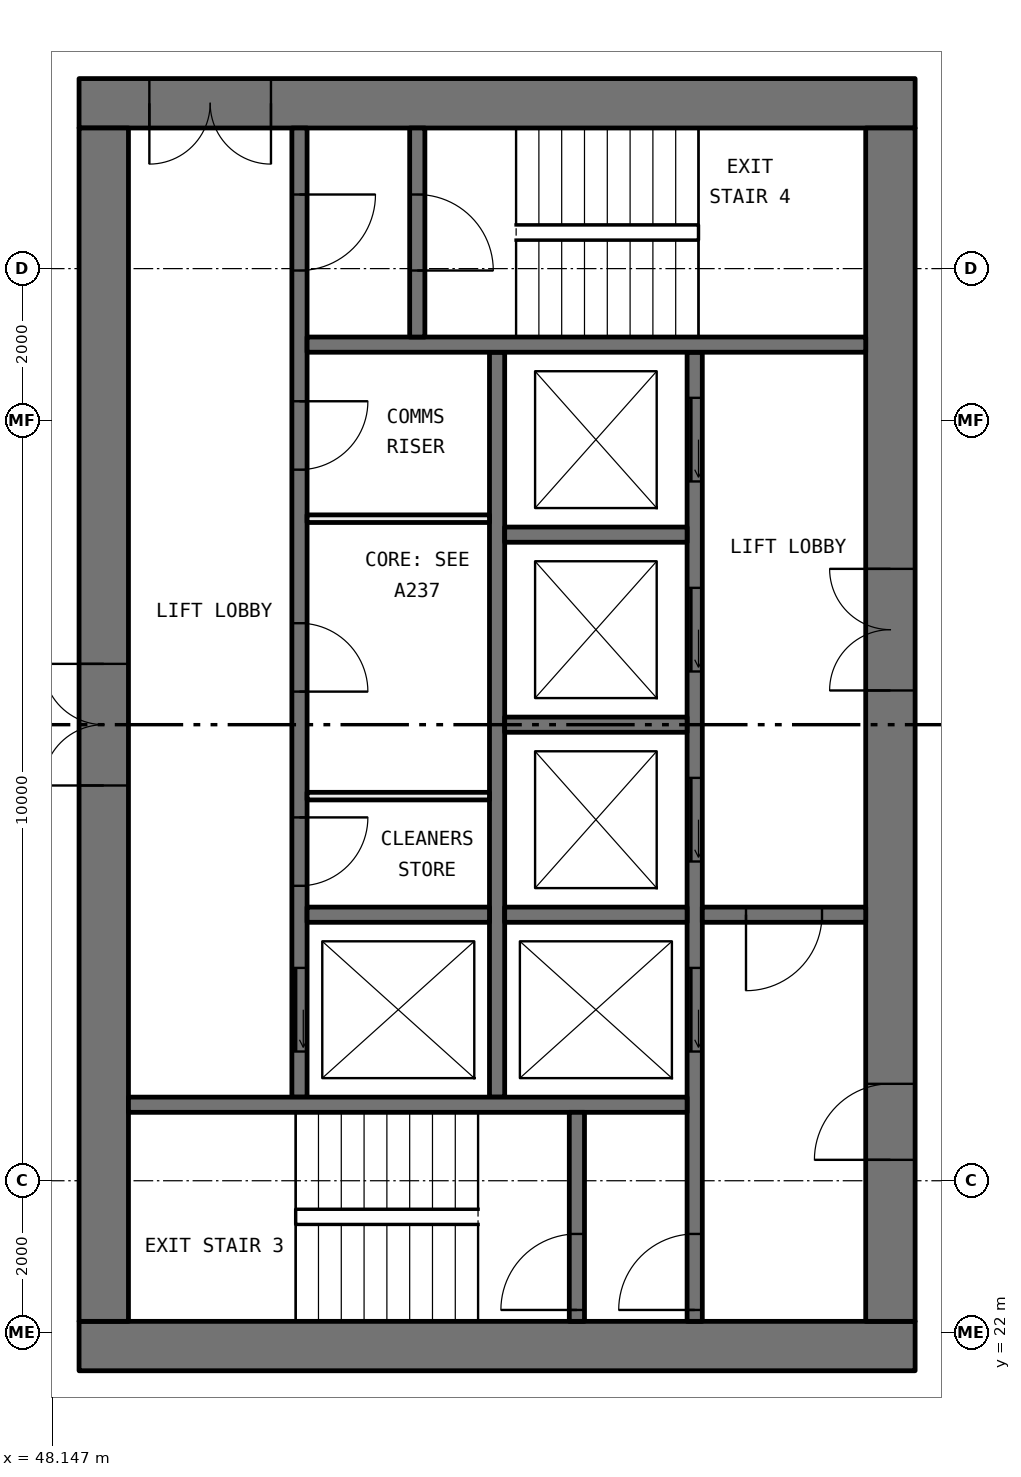
"""IFC4 building model, lengths in metres.
Left out: names, types, materials, properties, quantities, classifications, styles, units other than length and angle.
Written with IfcOpenShell. Run it as: python <this file> out.ifc"""

import sys

from ifc_helpers import new_model, si_unit, direction, frame, frame_2d, origin, place, context, subcontext, project, spatial, rectangle, extrude, element, fill, save


model = new_model("IFC4")
c1 = context("Model", 3, precision=1e-05, world=origin(), true_north=direction((0.0, 1.0)))
c2 = subcontext(c1, "Body", "Model", "MODEL_VIEW")
j1 = project(units=[si_unit("LENGTHUNIT", "METRE"), si_unit("PLANEANGLEUNIT", "RADIAN")], contexts=[c1])
p1 = place(None, origin())
s1 = spatial("IfcSite", under=j1, at=p1, CompositionType="ELEMENT")
p2 = place(p1, origin())
s2 = spatial("IfcBuilding", under=s1, at=p2, CompositionType="ELEMENT")
p3 = place(p2, frame((0.0, 0.0, 138.0)))
s3 = spatial("IfcBuildingStorey", under=s2, at=p3, CompositionType="ELEMENT", Elevation=138.0)
p4 = place(p3, frame((59.5, 21.825, 0.0), z_axis=(0.0, 0.0, 1.0), x_axis=(-1.0, 0.0, 0.0)))
e1 = element("IfcWall", 1, at=p4, inside=s3, PredefinedType="SHEAR", context=c2, shape_type="SweptSolid", body=[
    extrude(rectangle(XDim=11.0, YDim=0.65, at=frame_2d((5.5, 0.0))), origin(), (0.0, 0.0, 1.0), 3.05),
])
p5 = place(p3, frame((59.5, 38.175, 0.0), z_axis=(0.0, 0.0, 1.0), x_axis=(-1.0, 0.0, 0.0)))
e2 = element("IfcWall", 2, at=p5, inside=s3, PredefinedType="SHEAR", context=c2, shape_type="SweptSolid", body=[
    extrude(rectangle(XDim=11.0, YDim=0.65, at=frame_2d((5.5, 0.0))), origin(), (0.0, 0.0, 1.0), 3.05),
])
p6 = place(p5, frame((8.475, 0.0, 0.0)))
e3 = element("IfcOpeningElement", 3, at=p6, cuts=e2, PredefinedType="OPENING", context=c2, shape_type="SweptSolid", body=[
    extrude(rectangle(XDim=1.6, YDim=2.1, at=frame_2d((0.8, 1.05))), frame((0.0, 0.335, 0.0), z_axis=(0.0, -1.0, 0.0), x_axis=(1.0, 0.0, 0.0)), (0.0, 0.0, 1.0), 0.67),
])
p7 = place(p3, frame((59.175, 22.15, 0.0), z_axis=(0.0, 0.0, 1.0), x_axis=(0.0, 1.0, 0.0)))
e4 = element("IfcWall", 4, at=p7, inside=s3, PredefinedType="SHEAR", context=c2, shape_type="SweptSolid", body=[
    extrude(rectangle(XDim=15.7, YDim=0.65, at=frame_2d((7.85, 0.0))), origin(), (0.0, 0.0, 1.0), 3.05),
])
p8 = place(p7, frame((8.3, 0.0, 0.0)))
e5 = element("IfcOpeningElement", 5, at=p8, cuts=e4, PredefinedType="OPENING", context=c2, shape_type="SweptSolid", body=[
    extrude(rectangle(XDim=1.6, YDim=2.1, at=frame_2d((0.8, 1.05))), frame((0.0, 0.335, 0.0), z_axis=(0.0, -1.0, 0.0), x_axis=(1.0, 0.0, 0.0)), (0.0, 0.0, 1.0), 0.67),
])
p9 = place(p7, frame((2.125, 0.0, 0.0)))
e6 = element("IfcOpeningElement", 6, at=p9, cuts=e4, PredefinedType="OPENING", context=c2, shape_type="SweptSolid", body=[
    extrude(rectangle(XDim=1.0, YDim=2.1, at=frame_2d((0.5, 1.05))), frame((0.0, 0.335, 0.0), z_axis=(0.0, -1.0, 0.0), x_axis=(1.0, 0.0, 0.0)), (0.0, 0.0, 1.0), 0.67),
])
p10 = place(p3, frame((48.825, 22.15, 0.0), z_axis=(0.0, 0.0, 1.0), x_axis=(0.0, 1.0, 0.0)))
e7 = element("IfcWall", 7, at=p10, inside=s3, PredefinedType="SHEAR", context=c2, shape_type="SweptSolid", body=[
    extrude(rectangle(XDim=15.7, YDim=0.65, at=frame_2d((7.85, 0.0))), origin(), (0.0, 0.0, 1.0), 3.05),
])
p11 = place(p10, frame((7.05, 0.0, 0.0)))
e8 = element("IfcOpeningElement", 8, at=p11, cuts=e7, PredefinedType="OPENING", context=c2, shape_type="SweptSolid", body=[
    extrude(rectangle(XDim=1.6, YDim=2.1, at=frame_2d((0.8, 1.05))), frame((0.0, 0.335, 0.0), z_axis=(0.0, -1.0, 0.0), x_axis=(1.0, 0.0, 0.0)), (0.0, 0.0, 1.0), 0.67),
])
p12 = place(p3, frame((56.6, 22.15, 0.0), z_axis=(0.0, 0.0, 1.0), x_axis=(0.0, 1.0, 0.0)))
e9 = element("IfcWall", 9, at=p12, inside=s3, PredefinedType="SOLIDWALL", context=c2, shape_type="SweptSolid", body=[
    extrude(rectangle(XDim=12.75, YDim=0.2, at=frame_2d((6.375, 0.0))), origin(), (0.0, 0.0, 1.0), 3.05),
])
p13 = place(p12, frame((3.55, 0.0, 0.0)))
e10 = element("IfcOpeningElement", 10, at=p13, cuts=e9, PredefinedType="OPENING", context=c2, shape_type="SweptSolid", body=[
    extrude(rectangle(XDim=1.1, YDim=2.1, at=frame_2d((0.55, 1.05))), frame((0.0, 0.11, 0.0), z_axis=(0.0, -1.0, 0.0), x_axis=(1.0, 0.0, 0.0)), (0.0, 0.0, 1.0), 0.22),
])
p14 = place(p12, frame((6.05, 0.0, 0.0)))
e11 = element("IfcOpeningElement", 11, at=p14, cuts=e9, PredefinedType="OPENING", context=c2, shape_type="SweptSolid", body=[
    extrude(rectangle(XDim=1.1, YDim=2.1, at=frame_2d((0.55, 1.05))), frame((0.0, 0.11, 0.0), z_axis=(0.0, -1.0, 0.0), x_axis=(1.0, 0.0, 0.0)), (0.0, 0.0, 1.0), 0.22),
])
p15 = place(p12, frame((8.55, 0.0, 0.0)))
e12 = element("IfcOpeningElement", 12, at=p15, cuts=e9, PredefinedType="OPENING", context=c2, shape_type="SweptSolid", body=[
    extrude(rectangle(XDim=1.1, YDim=2.1, at=frame_2d((0.55, 1.05))), frame((0.0, 0.11, 0.0), z_axis=(0.0, -1.0, 0.0), x_axis=(1.0, 0.0, 0.0)), (0.0, 0.0, 1.0), 0.22),
])
p16 = place(p12, frame((11.05, 0.0, 0.0)))
e13 = element("IfcOpeningElement", 13, at=p16, cuts=e9, PredefinedType="OPENING", context=c2, shape_type="SweptSolid", body=[
    extrude(rectangle(XDim=1.1, YDim=2.1, at=frame_2d((0.55, 1.05))), frame((0.0, 0.11, 0.0), z_axis=(0.0, -1.0, 0.0), x_axis=(1.0, 0.0, 0.0)), (0.0, 0.0, 1.0), 0.22),
])
p17 = place(p12, frame((0.15, 0.0, 0.0)))
e14 = element("IfcOpeningElement", 14, at=p17, cuts=e9, PredefinedType="OPENING", context=c2, shape_type="SweptSolid", body=[
    extrude(rectangle(XDim=1.0, YDim=2.1, at=frame_2d((0.5, 1.05))), frame((0.0, 0.11, 0.0), z_axis=(0.0, -1.0, 0.0), x_axis=(1.0, 0.0, 0.0)), (0.0, 0.0, 1.0), 0.22),
])
p18 = place(p3, frame((51.4, 25.1, 0.0), z_axis=(0.0, 0.0, 1.0), x_axis=(0.0, 1.0, 0.0)))
e15 = element("IfcWall", 15, at=p18, inside=s3, PredefinedType="SOLIDWALL", context=c2, shape_type="SweptSolid", body=[
    extrude(rectangle(XDim=12.75, YDim=0.2, at=frame_2d((6.375, 0.0))), origin(), (0.0, 0.0, 1.0), 3.05),
])
p19 = place(p18, frame((0.6, 0.0, 0.0)))
e16 = element("IfcOpeningElement", 16, at=p19, cuts=e15, PredefinedType="OPENING", context=c2, shape_type="SweptSolid", body=[
    extrude(rectangle(XDim=1.1, YDim=2.1, at=frame_2d((0.55, 1.05))), frame((0.0, 0.11, 0.0), z_axis=(0.0, -1.0, 0.0), x_axis=(1.0, 0.0, 0.0)), (0.0, 0.0, 1.0), 0.22),
])
p20 = place(p18, frame((10.875, 0.0, 0.0)))
e17 = element("IfcOpeningElement", 17, at=p20, cuts=e15, PredefinedType="OPENING", context=c2, shape_type="SweptSolid", body=[
    extrude(rectangle(XDim=1.0, YDim=2.1, at=frame_2d((0.5, 1.05))), frame((0.0, 0.11, 0.0), z_axis=(0.0, -1.0, 0.0), x_axis=(1.0, 0.0, 0.0)), (0.0, 0.0, 1.0), 0.22),
])
p21 = place(p18, frame((2.78, 0.0, 0.0)))
e18 = element("IfcOpeningElement", 18, at=p21, cuts=e15, PredefinedType="OPENING", context=c2, shape_type="SweptSolid", body=[
    extrude(rectangle(XDim=0.9, YDim=2.1, at=frame_2d((0.45, 1.05))), frame((0.0, 0.11, 0.0), z_axis=(0.0, -1.0, 0.0), x_axis=(1.0, 0.0, 0.0)), (0.0, 0.0, 1.0), 0.22),
])
p22 = place(p18, frame((5.335, 0.0, 0.0)))
e19 = element("IfcOpeningElement", 19, at=p22, cuts=e15, PredefinedType="OPENING", context=c2, shape_type="SweptSolid", body=[
    extrude(rectangle(XDim=0.9, YDim=2.1, at=frame_2d((0.45, 1.05))), frame((0.0, 0.11, 0.0), z_axis=(0.0, -1.0, 0.0), x_axis=(1.0, 0.0, 0.0)), (0.0, 0.0, 1.0), 0.22),
])
p23 = place(p18, frame((8.255, 0.0, 0.0)))
e20 = element("IfcOpeningElement", 20, at=p23, cuts=e15, PredefinedType="OPENING", context=c2, shape_type="SweptSolid", body=[
    extrude(rectangle(XDim=0.9, YDim=2.1, at=frame_2d((0.45, 1.05))), frame((0.0, 0.11, 0.0), z_axis=(0.0, -1.0, 0.0), x_axis=(1.0, 0.0, 0.0)), (0.0, 0.0, 1.0), 0.22),
])
p24 = place(p3, frame((54.0, 25.1, 0.0), z_axis=(0.0, 0.0, 1.0), x_axis=(0.0, 1.0, 0.0)))
e21 = element("IfcWall", 21, at=p24, inside=s3, PredefinedType="SOLIDWALL", context=c2, shape_type="SweptSolid", body=[
    extrude(rectangle(XDim=9.8, YDim=0.2, at=frame_2d((4.9, 0.0))), origin(), (0.0, 0.0, 1.0), 3.05),
])
for number, where, z_axis, x_axis in (
    (22, (56.5, 25.0, 0.0), (0.0, 0.0, 1.0), (-1.0, 0.0, 0.0)),
    (23, (58.85, 35.0, 0.0), (0.0, 0.0, 1.0), (-1.0, 0.0, 0.0)),
):
    element("IfcWall", number, at=place(p3, frame(where, z_axis=z_axis, x_axis=x_axis)), inside=s3, PredefinedType="SOLIDWALL", context=c2, shape_type="SweptSolid", body=[
        extrude(rectangle(XDim=7.35, YDim=0.2, at=frame_2d((3.675, 0.0))), origin(), (0.0, 0.0, 1.0), 3.05),
    ])
p25 = place(p3, frame((58.85, 27.5, 0.0), z_axis=(0.0, 0.0, 1.0), x_axis=(-1.0, 0.0, 0.0)))
e24 = element("IfcWall", 24, at=p25, inside=s3, PredefinedType="SOLIDWALL", context=c2, shape_type="SweptSolid", body=[
    extrude(rectangle(XDim=2.15, YDim=0.2, at=frame_2d((1.075, 0.0))), origin(), (0.0, 0.0, 1.0), 3.05),
])
p26 = place(p25, frame((0.575, 0.0, 0.0)))
e25 = element("IfcOpeningElement", 25, at=p26, cuts=e24, PredefinedType="OPENING", context=c2, shape_type="SweptSolid", body=[
    extrude(rectangle(XDim=1.0, YDim=2.1, at=frame_2d((0.5, 1.05))), frame((0.0, 0.11, 0.0), z_axis=(0.0, -1.0, 0.0), x_axis=(1.0, 0.0, 0.0)), (0.0, 0.0, 1.0), 0.22),
])
p27 = place(p3, frame((55.05, 22.15, 0.0), z_axis=(0.0, 0.0, 1.0), x_axis=(0.0, 1.0, 0.0)))
e26 = element("IfcWall", 26, at=p27, inside=s3, PredefinedType="SOLIDWALL", context=c2, shape_type="SweptSolid", body=[
    extrude(rectangle(XDim=2.75, YDim=0.2, at=frame_2d((1.375, 0.0))), origin(), (0.0, 0.0, 1.0), 3.05),
])
p28 = place(p27, frame((0.15, 0.0, 0.0)))
e27 = element("IfcOpeningElement", 27, at=p28, cuts=e26, PredefinedType="OPENING", context=c2, shape_type="SweptSolid", body=[
    extrude(rectangle(XDim=1.0, YDim=2.1, at=frame_2d((0.5, 1.05))), frame((0.0, 0.11, 0.0), z_axis=(0.0, -1.0, 0.0), x_axis=(1.0, 0.0, 0.0)), (0.0, 0.0, 1.0), 0.22),
])
p29 = place(p3, frame((52.95, 35.1, 0.0), z_axis=(0.0, 0.0, 1.0), x_axis=(0.0, 1.0, 0.0)))
e28 = element("IfcWall", 28, at=p29, inside=s3, PredefinedType="SOLIDWALL", context=c2, shape_type="SweptSolid", body=[
    extrude(rectangle(XDim=2.75, YDim=0.2, at=frame_2d((1.375, 0.0))), origin(), (0.0, 0.0, 1.0), 3.05),
])
p30 = place(p29, frame((0.875, 0.0, 0.0)))
e29 = element("IfcOpeningElement", 29, at=p30, cuts=e28, PredefinedType="OPENING", context=c2, shape_type="SweptSolid", body=[
    extrude(rectangle(XDim=1.0, YDim=2.1, at=frame_2d((0.5, 1.05))), frame((0.0, 0.11, 0.0), z_axis=(0.0, -1.0, 0.0), x_axis=(1.0, 0.0, 0.0)), (0.0, 0.0, 1.0), 0.22),
])
for number, where, z_axis, x_axis in (
    (30, (56.5, 27.5, 0.0), (0.0, 0.0, 1.0), (-1.0, 0.0, 0.0)),
    (31, (56.5, 30.0, 0.0), (0.0, 0.0, 1.0), (-1.0, 0.0, 0.0)),
    (32, (56.5, 32.5, 0.0), (0.0, 0.0, 1.0), (-1.0, 0.0, 0.0)),
    (33, (53.9, 27.5, 0.0), (0.0, 0.0, 1.0), (-1.0, 0.0, 0.0)),
):
    element("IfcWall", number, at=place(p3, frame(where, z_axis=z_axis, x_axis=x_axis)), inside=s3, PredefinedType="SOLIDWALL", context=c2, shape_type="SweptSolid", body=[
        extrude(rectangle(XDim=2.4, YDim=0.2, at=frame_2d((1.2, 0.0))), origin(), (0.0, 0.0, 1.0), 3.05),
    ])
for number, where, z_axis, x_axis in (
    (34, (53.9, 29.06, 0.0), (0.0, 0.0, 1.0), (-1.0, 0.0, 0.0)),
    (35, (53.9, 32.71, 0.0), (0.0, 0.0, 1.0), (-1.0, 0.0, 0.0)),
):
    element("IfcWall", number, at=place(p3, frame(where, z_axis=z_axis, x_axis=x_axis)), inside=s3, PredefinedType="PARTITIONING", context=c2, shape_type="SweptSolid", body=[
        extrude(rectangle(XDim=2.4, YDim=0.1, at=frame_2d((1.2, 0.0))), origin(), (0.0, 0.0, 1.0), 3.05),
    ])
p31 = place(p19, origin())
e36 = element("IfcDoor", 36, at=p31, inside=s3, OperationType="SLIDING_TO_LEFT", PredefinedType="DOOR", context=c2, shape_type="SweptSolid", body=[
    extrude(rectangle(XDim=1.1, YDim=2.1, at=frame_2d((0.55, 1.05))), frame((0.0, 0.025, 0.0), z_axis=(0.0, -1.0, 0.0), x_axis=(1.0, 0.0, 0.0)), (0.0, 0.0, 1.0), 0.05),
])
fill(e16, e36)
p32 = place(p13, origin())
e37 = element("IfcDoor", 37, at=p32, inside=s3, OperationType="SLIDING_TO_LEFT", PredefinedType="DOOR", context=c2, shape_type="SweptSolid", body=[
    extrude(rectangle(XDim=1.1, YDim=2.1, at=frame_2d((0.55, 1.05))), frame((0.0, 0.025, 0.0), z_axis=(0.0, -1.0, 0.0), x_axis=(1.0, 0.0, 0.0)), (0.0, 0.0, 1.0), 0.05),
])
fill(e10, e37)
p33 = place(p14, origin())
e38 = element("IfcDoor", 38, at=p33, inside=s3, OperationType="SLIDING_TO_LEFT", PredefinedType="DOOR", context=c2, shape_type="SweptSolid", body=[
    extrude(rectangle(XDim=1.1, YDim=2.1, at=frame_2d((0.55, 1.05))), frame((0.0, 0.025, 0.0), z_axis=(0.0, -1.0, 0.0), x_axis=(1.0, 0.0, 0.0)), (0.0, 0.0, 1.0), 0.05),
])
fill(e11, e38)
p34 = place(p15, origin())
e39 = element("IfcDoor", 39, at=p34, inside=s3, OperationType="SLIDING_TO_LEFT", PredefinedType="DOOR", context=c2, shape_type="SweptSolid", body=[
    extrude(rectangle(XDim=1.1, YDim=2.1, at=frame_2d((0.55, 1.05))), frame((0.0, 0.025, 0.0), z_axis=(0.0, -1.0, 0.0), x_axis=(1.0, 0.0, 0.0)), (0.0, 0.0, 1.0), 0.05),
])
fill(e12, e39)
p35 = place(p16, origin())
e40 = element("IfcDoor", 40, at=p35, inside=s3, OperationType="SLIDING_TO_LEFT", PredefinedType="DOOR", context=c2, shape_type="SweptSolid", body=[
    extrude(rectangle(XDim=1.1, YDim=2.1, at=frame_2d((0.55, 1.05))), frame((0.0, 0.025, 0.0), z_axis=(0.0, -1.0, 0.0), x_axis=(1.0, 0.0, 0.0)), (0.0, 0.0, 1.0), 0.05),
])
fill(e13, e40)
p36 = place(p28, origin())
e41 = element("IfcDoor", 41, at=p36, inside=s3, OperationType="SINGLE_SWING_RIGHT", PredefinedType="DOOR", context=c2, shape_type="SweptSolid", body=[
    extrude(rectangle(XDim=1.0, YDim=2.1, at=frame_2d((0.5, 1.05))), frame((0.0, 0.025, 0.0), z_axis=(0.0, -1.0, 0.0), x_axis=(1.0, 0.0, 0.0)), (0.0, 0.0, 1.0), 0.05),
])
fill(e27, e41)
p37 = place(p17, origin())
e42 = element("IfcDoor", 42, at=p37, inside=s3, OperationType="SINGLE_SWING_RIGHT", PredefinedType="DOOR", context=c2, shape_type="SweptSolid", body=[
    extrude(rectangle(XDim=1.0, YDim=2.1, at=frame_2d((0.5, 1.05))), frame((0.0, 0.025, 0.0), z_axis=(0.0, -1.0, 0.0), x_axis=(1.0, 0.0, 0.0)), (0.0, 0.0, 1.0), 0.05),
])
fill(e14, e42)
p38 = place(p20, frame((1.0, 0.0, 0.0), x_axis=(-1.0, 0.0, 0.0)))
e43 = element("IfcDoor", 43, at=p38, inside=s3, OperationType="SINGLE_SWING_RIGHT", PredefinedType="DOOR", context=c2, shape_type="SweptSolid", body=[
    extrude(rectangle(XDim=1.0, YDim=2.1, at=frame_2d((0.5, 1.05))), frame((0.0, 0.025, 0.0), z_axis=(0.0, -1.0, 0.0), x_axis=(1.0, 0.0, 0.0)), (0.0, 0.0, 1.0), 0.05),
])
fill(e17, e43)
p39 = place(p30, frame((1.0, 0.0, 0.0), x_axis=(-1.0, 0.0, 0.0)))
e44 = element("IfcDoor", 44, at=p39, inside=s3, OperationType="SINGLE_SWING_LEFT", PredefinedType="DOOR", context=c2, shape_type="SweptSolid", body=[
    extrude(rectangle(XDim=1.0, YDim=2.1, at=frame_2d((0.5, 1.05))), frame((0.0, 0.025, 0.0), z_axis=(0.0, -1.0, 0.0), x_axis=(1.0, 0.0, 0.0)), (0.0, 0.0, 1.0), 0.05),
])
fill(e29, e44)
p40 = place(p26, origin())
e45 = element("IfcDoor", 45, at=p40, inside=s3, OperationType="SINGLE_SWING_LEFT", PredefinedType="DOOR", context=c2, shape_type="SweptSolid", body=[
    extrude(rectangle(XDim=1.0, YDim=2.1, at=frame_2d((0.5, 1.05))), frame((0.0, 0.025, 0.0), z_axis=(0.0, -1.0, 0.0), x_axis=(1.0, 0.0, 0.0)), (0.0, 0.0, 1.0), 0.05),
])
fill(e25, e45)
p41 = place(p8, origin())
e46 = element("IfcDoor", 46, at=p41, inside=s3, OperationType="DOUBLE_DOOR_SINGLE_SWING", PredefinedType="DOOR", context=c2, shape_type="SweptSolid", body=[
    extrude(rectangle(XDim=1.6, YDim=2.1, at=frame_2d((0.8, 1.05))), frame((0.0, 0.025, 0.0), z_axis=(0.0, -1.0, 0.0), x_axis=(1.0, 0.0, 0.0)), (0.0, 0.0, 1.0), 0.05),
])
fill(e5, e46)
p42 = place(p9, origin())
e47 = element("IfcDoor", 47, at=p42, inside=s3, OperationType="SINGLE_SWING_RIGHT", PredefinedType="DOOR", context=c2, shape_type="SweptSolid", body=[
    extrude(rectangle(XDim=1.0, YDim=2.1, at=frame_2d((0.5, 1.05))), frame((0.0, 0.025, 0.0), z_axis=(0.0, -1.0, 0.0), x_axis=(1.0, 0.0, 0.0)), (0.0, 0.0, 1.0), 0.05),
])
fill(e6, e47)
p43 = place(p6, origin())
e48 = element("IfcDoor", 48, at=p43, inside=s3, OperationType="DOUBLE_DOOR_SINGLE_SWING", PredefinedType="DOOR", context=c2, shape_type="SweptSolid", body=[
    extrude(rectangle(XDim=1.6, YDim=2.1, at=frame_2d((0.8, 1.05))), frame((0.0, 0.025, 0.0), z_axis=(0.0, -1.0, 0.0), x_axis=(1.0, 0.0, 0.0)), (0.0, 0.0, 1.0), 0.05),
])
fill(e3, e48)
p44 = place(p11, origin())
e49 = element("IfcDoor", 49, at=p44, inside=s3, OperationType="DOUBLE_DOOR_SINGLE_SWING", PredefinedType="DOOR", context=c2, shape_type="SweptSolid", body=[
    extrude(rectangle(XDim=1.6, YDim=2.1, at=frame_2d((0.8, 1.05))), frame((0.0, 0.025, 0.0), z_axis=(0.0, -1.0, 0.0), x_axis=(1.0, 0.0, 0.0)), (0.0, 0.0, 1.0), 0.05),
])
fill(e8, e49)
p45 = place(p21, frame((0.9, 0.0, 0.0), x_axis=(-1.0, 0.0, 0.0)))
e50 = element("IfcDoor", 50, at=p45, inside=s3, OperationType="SINGLE_SWING_RIGHT", PredefinedType="DOOR", context=c2, shape_type="SweptSolid", body=[
    extrude(rectangle(XDim=0.9, YDim=2.1, at=frame_2d((0.45, 1.05))), frame((0.0, 0.025, 0.0), z_axis=(0.0, -1.0, 0.0), x_axis=(1.0, 0.0, 0.0)), (0.0, 0.0, 1.0), 0.05),
])
fill(e18, e50)
p46 = place(p22, frame((0.9, 0.0, 0.0), x_axis=(-1.0, 0.0, 0.0)))
e51 = element("IfcDoor", 51, at=p46, inside=s3, OperationType="SINGLE_SWING_LEFT", PredefinedType="DOOR", context=c2, shape_type="SweptSolid", body=[
    extrude(rectangle(XDim=0.9, YDim=2.1, at=frame_2d((0.45, 1.05))), frame((0.0, 0.025, 0.0), z_axis=(0.0, -1.0, 0.0), x_axis=(1.0, 0.0, 0.0)), (0.0, 0.0, 1.0), 0.05),
])
fill(e19, e51)
p47 = place(p23, frame((0.9, 0.0, 0.0), x_axis=(-1.0, 0.0, 0.0)))
e52 = element("IfcDoor", 52, at=p47, inside=s3, OperationType="SINGLE_SWING_RIGHT", PredefinedType="DOOR", context=c2, shape_type="SweptSolid", body=[
    extrude(rectangle(XDim=0.9, YDim=2.1, at=frame_2d((0.45, 1.05))), frame((0.0, 0.025, 0.0), z_axis=(0.0, -1.0, 0.0), x_axis=(1.0, 0.0, 0.0)), (0.0, 0.0, 1.0), 0.05),
])
fill(e20, e52)
save(model, sys.argv[1])
